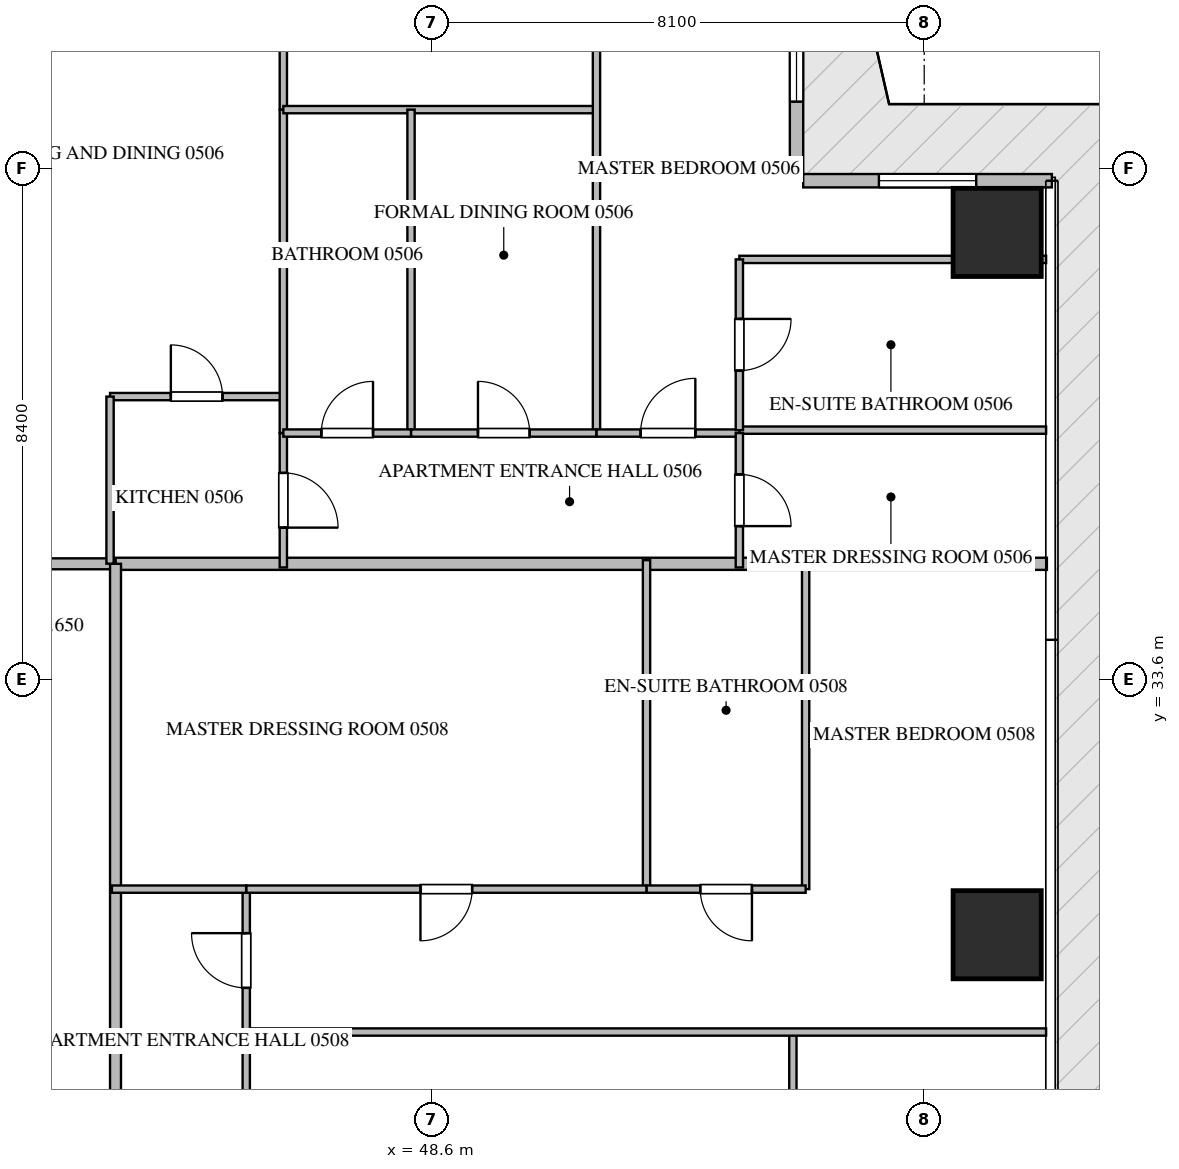
"""IFC4 building model, lengths in metres.
Left out: names, types, materials, properties, quantities, classifications, styles, units other than length and angle.
Written with IfcOpenShell. Run it as: python <this file> out.ifc"""

import sys

from ifc_helpers import new_model, si_unit, direction, frame, frame_2d, origin, origin_2d, place, context, subcontext, project, spatial, rectangle, extrude, source, transform, mapped, element, fill, save


model = new_model("IFC4")
c1 = context("Model", 3, precision=1e-05, world=origin(), true_north=direction((0.0, 1.0)))
c2 = subcontext(c1, "Body", "Model", "MODEL_VIEW")
j1 = project(units=[si_unit("LENGTHUNIT", "METRE"), si_unit("PLANEANGLEUNIT", "RADIAN")], contexts=[c1])
p1 = place(None, origin())
s1 = spatial("IfcSite", under=j1, at=p1, CompositionType="ELEMENT")
p2 = place(p1, origin())
s2 = spatial("IfcBuilding", under=s1, at=p2, CompositionType="ELEMENT")
p3 = place(p2, frame((0.0, 0.0, 26.7)))
s3 = spatial("IfcBuildingStorey", under=s2, at=p3, CompositionType="ELEMENT", Elevation=26.7)
m1 = source(origin(), c2, "Body", "SweptSolid", [
    extrude(rectangle(XDim=1.45, YDim=1.45, at=origin_2d()), origin(), (0.0, 0.0, 1.0), 3.93),
])
for number, where, z_axis, x_axis in (
    (1, (57.9, 29.4, -0.44), (0.0, 0.0, 1.0), (1.0, 0.0, 0.0)),
    (2, (57.9, 40.95, -0.44), (0.0, 0.0, 1.0), (1.0, 0.0, 0.0)),
):
    element("IfcColumn", number, at=place(p3, frame(where, z_axis=z_axis, x_axis=x_axis)), inside=s3, PredefinedType="COLUMN", context=c2, shape_type="MappedRepresentation", body=[
        mapped(m1, transform((0.0, 0.0, 0.0), scale=1.0)),
    ])
p4 = place(p3, frame((58.8, 41.8, 0.0), z_axis=(0.0, 0.0, 1.0), x_axis=(-1.0, 0.0, 0.0)))
e3 = element("IfcWall", 3, at=p4, inside=s3, PredefinedType="ELEMENTEDWALL", context=c2, shape_type="SweptSolid", body=[
    extrude(rectangle(XDim=4.09, YDim=0.22, at=frame_2d((2.045, 0.0))), origin(), (0.0, 0.0, 1.0), 3.475),
])
p5 = place(p4, frame((1.245, 0.0, 0.65)))
e4 = element("IfcOpeningElement", 4, at=p5, cuts=e3, PredefinedType="OPENING", context=c2, shape_type="SweptSolid", body=[
    extrude(rectangle(XDim=1.6, YDim=2.1, at=frame_2d((0.8, 1.05))), frame((0.0, 0.12, 0.0), z_axis=(0.0, -1.0, 0.0), x_axis=(1.0, 0.0, 0.0)), (0.0, 0.0, 1.0), 0.24),
])
p6 = place(p3, frame((54.6, 41.91, 0.0), z_axis=(0.0, 0.0, 1.0), x_axis=(0.0, 1.0, 0.0)))
e5 = element("IfcWall", 5, at=p6, inside=s3, PredefinedType="ELEMENTEDWALL", context=c2, shape_type="SweptSolid", body=[
    extrude(rectangle(XDim=3.98, YDim=0.22, at=frame_2d((1.99, 0.0))), origin(), (0.0, 0.0, 1.0), 3.475),
])
p7 = place(p6, frame((1.19, 0.0, 0.65)))
e6 = element("IfcOpeningElement", 6, at=p7, cuts=e5, PredefinedType="OPENING", context=c2, shape_type="SweptSolid", body=[
    extrude(rectangle(XDim=1.6, YDim=2.1, at=frame_2d((0.8, 1.05))), frame((0.0, 0.12, 0.0), z_axis=(0.0, -1.0, 0.0), x_axis=(1.0, 0.0, 0.0)), (0.0, 0.0, 1.0), 0.24),
])
p8 = place(p3, frame((43.4, 35.5, 0.0), z_axis=(0.0, 0.0, 1.0), x_axis=(1.0, 0.0, 0.0)))
e7 = element("IfcWall", 7, at=p8, inside=s3, PredefinedType="PARTITIONING", context=c2, shape_type="SweptSolid", body=[
    extrude(rectangle(XDim=15.318, YDim=0.2, at=frame_2d((7.659, 0.0))), origin(), (0.0, 0.0, 1.0), 3.49),
])
p9 = place(p3, frame((21.402, 35.5, 0.0), z_axis=(0.0, 0.0, 1.0), x_axis=(1.0, 0.0, 0.0)))
e8 = element("IfcWall", 8, at=p9, inside=s3, PredefinedType="PARTITIONING", context=c2, shape_type="SweptSolid", body=[
    extrude(rectangle(XDim=21.996, YDim=0.18, at=frame_2d((10.998, 0.0))), origin(), (0.0, 0.0, 1.0), 3.49),
])
p10 = place(p9, frame((2.1, 0.0, 0.0)))
e9 = element("IfcOpeningElement", 9, at=p10, cuts=e8, PredefinedType="OPENING", context=c2, shape_type="SweptSolid", body=[
    extrude(rectangle(XDim=1.0, YDim=2.15, at=frame_2d((0.5, 1.075))), frame((0.0, 0.1, 0.0), z_axis=(0.0, -1.0, 0.0), x_axis=(1.0, 0.0, 0.0)), (0.0, 0.0, 1.0), 0.2),
])
p11 = place(p9, frame((14.277, 0.0, 0.0)))
e10 = element("IfcOpeningElement", 10, at=p11, cuts=e8, PredefinedType="OPENING", context=c2, shape_type="SweptSolid", body=[
    extrude(rectangle(XDim=1.0, YDim=2.15, at=frame_2d((0.5, 1.075))), frame((0.0, 0.1, 0.0), z_axis=(0.0, -1.0, 0.0), x_axis=(1.0, 0.0, 0.0)), (0.0, 0.0, 1.0), 0.2),
])
p12 = place(p9, frame((18.896, 0.0, 0.0)))
e11 = element("IfcOpeningElement", 11, at=p12, cuts=e8, PredefinedType="OPENING", context=c2, shape_type="SweptSolid", body=[
    extrude(rectangle(XDim=1.0, YDim=2.15, at=frame_2d((0.5, 1.075))), frame((0.0, 0.1, 0.0), z_axis=(0.0, -1.0, 0.0), x_axis=(1.0, 0.0, 0.0)), (0.0, 0.0, 1.0), 0.2),
])
p13 = place(p3, frame((43.4, 14.9, 0.0), z_axis=(0.0, 0.0, 1.0), x_axis=(0.0, 1.0, 0.0)))
e12 = element("IfcWall", 12, at=p13, inside=s3, PredefinedType="PARTITIONING", context=c2, shape_type="SweptSolid", body=[
    extrude(rectangle(XDim=20.6, YDim=0.18, at=frame_2d((10.3, 0.0))), origin(), (0.0, 0.0, 1.0), 3.49),
])
p14 = place(p13, frame((1.96, 0.0, 0.0)))
e13 = element("IfcOpeningElement", 13, at=p14, cuts=e12, PredefinedType="OPENING", context=c2, shape_type="SweptSolid", body=[
    extrude(rectangle(XDim=1.0, YDim=2.15, at=frame_2d((0.5, 1.075))), frame((0.0, 0.1, 0.0), z_axis=(0.0, -1.0, 0.0), x_axis=(1.0, 0.0, 0.0)), (0.0, 0.0, 1.0), 0.2),
])
p15 = place(p3, frame((43.31, 38.25, 0.0), z_axis=(0.0, 0.0, 1.0), x_axis=(1.0, 0.0, 0.0)))
e14 = element("IfcWall", 14, at=p15, inside=s3, PredefinedType="PARTITIONING", context=c2, shape_type="SweptSolid", body=[
    extrude(rectangle(XDim=2.85, YDim=0.12, at=frame_2d((1.425, 0.0))), origin(), (0.0, 0.0, 1.0), 3.49),
])
p16 = place(p15, frame((1.0, 0.0, 0.0)))
e15 = element("IfcOpeningElement", 15, at=p16, cuts=e14, PredefinedType="OPENING", context=c2, shape_type="SweptSolid", body=[
    extrude(rectangle(XDim=0.85, YDim=2.1, at=frame_2d((0.425, 1.05))), frame((0.0, 0.07, 0.0), z_axis=(0.0, -1.0, 0.0), x_axis=(1.0, 0.0, 0.0)), (0.0, 0.0, 1.0), 0.14),
])
p17 = place(p3, frame((43.31, 38.25, 0.0), z_axis=(0.0, 0.0, 1.0), x_axis=(0.0, -1.0, 0.0)))
e16 = element("IfcWall", 16, at=p17, inside=s3, PredefinedType="PARTITIONING", context=c2, shape_type="SweptSolid", body=[
    extrude(rectangle(XDim=2.748, YDim=0.12, at=frame_2d((1.374, 0.0))), origin(), (0.0, 0.0, 1.0), 3.49),
])
p18 = place(p3, frame((46.16, 37.65, 0.0), z_axis=(0.0, 0.0, 1.0), x_axis=(0.0, -1.0, 0.0)))
e17 = element("IfcWall", 17, at=p18, inside=s3, PredefinedType="PARTITIONING", context=c2, shape_type="SweptSolid", body=[
    extrude(rectangle(XDim=2.21, YDim=0.12, at=frame_2d((1.105, 0.0))), origin(), (0.0, 0.0, 1.0), 3.49),
])
p19 = place(p18, frame((0.655, 0.0, 0.0)))
e18 = element("IfcOpeningElement", 18, at=p19, cuts=e17, PredefinedType="OPENING", context=c2, shape_type="SweptSolid", body=[
    extrude(rectangle(XDim=0.9, YDim=2.1, at=frame_2d((0.45, 1.05))), frame((0.0, 0.07, 0.0), z_axis=(0.0, -1.0, 0.0), x_axis=(1.0, 0.0, 0.0)), (0.0, 0.0, 1.0), 0.14),
])
p20 = place(p3, frame((46.16, 50.105, 0.0), z_axis=(0.0, 0.0, 1.0), x_axis=(0.0, -1.0, 0.0)))
e19 = element("IfcWall", 19, at=p20, inside=s3, PredefinedType="PARTITIONING", context=c2, shape_type="SweptSolid", body=[
    extrude(rectangle(XDim=7.136, YDim=0.12, at=frame_2d((3.568, 0.0))), origin(), (0.0, 0.0, 1.0), 3.49),
])
p21 = place(p20, frame((3.43, 0.0, 0.0)))
e20 = element("IfcOpeningElement", 20, at=p21, cuts=e19, PredefinedType="OPENING", context=c2, shape_type="SweptSolid", body=[
    extrude(rectangle(XDim=0.9, YDim=2.1, at=frame_2d((0.45, 1.05))), frame((0.0, 0.07, 0.0), z_axis=(0.0, -1.0, 0.0), x_axis=(1.0, 0.0, 0.0)), (0.0, 0.0, 1.0), 0.14),
])
p22 = place(p3, frame((46.16, 42.967, 0.0), z_axis=(0.0, 0.0, 1.0), x_axis=(0.0, -1.0, 0.0)))
e21 = element("IfcWall", 21, at=p22, inside=s3, PredefinedType="PARTITIONING", context=c2, shape_type="SweptSolid", body=[
    extrude(rectangle(XDim=5.315, YDim=0.12, at=frame_2d((2.657, 0.0))), origin(), (0.0, 0.0, 1.0), 3.49),
])
p23 = place(p3, frame((46.16, 42.969, 0.0), z_axis=(0.0, 0.0, 1.0), x_axis=(1.0, 0.0, 0.0)))
e22 = element("IfcWall", 22, at=p23, inside=s3, PredefinedType="PARTITIONING", context=c2, shape_type="SweptSolid", body=[
    extrude(rectangle(XDim=5.15, YDim=0.12, at=frame_2d((2.575, 0.0))), origin(), (0.0, 0.0, 1.0), 3.49),
])
p24 = place(p3, frame((51.31, 45.905, 0.0), z_axis=(0.0, 0.0, 1.0), x_axis=(0.0, -1.0, 0.0)))
e23 = element("IfcWall", 23, at=p24, inside=s3, PredefinedType="PARTITIONING", context=c2, shape_type="SweptSolid", body=[
    extrude(rectangle(XDim=8.255, YDim=0.12, at=frame_2d((4.127, 0.0))), origin(), (0.0, 0.0, 1.0), 3.49),
])
p25 = place(p3, frame((48.26, 42.969, 0.0), z_axis=(0.0, 0.0, 1.0), x_axis=(0.0, -1.0, 0.0)))
e24 = element("IfcWall", 24, at=p25, inside=s3, PredefinedType="PARTITIONING", context=c2, shape_type="SweptSolid", body=[
    extrude(rectangle(XDim=5.319, YDim=0.12, at=frame_2d((2.66, 0.0))), origin(), (0.0, 0.0, 1.0), 3.49),
])
p26 = place(p3, frame((46.16, 37.65, 0.0), z_axis=(0.0, 0.0, 1.0), x_axis=(1.0, 0.0, 0.0)))
e25 = element("IfcWall", 25, at=p26, inside=s3, PredefinedType="PARTITIONING", context=c2, shape_type="SweptSolid", body=[
    extrude(rectangle(XDim=2.1, YDim=0.12, at=frame_2d((1.05, 0.0))), origin(), (0.0, 0.0, 1.0), 3.49),
])
p27 = place(p26, frame((0.625, 0.0, 0.0)))
e26 = element("IfcOpeningElement", 26, at=p27, cuts=e25, PredefinedType="OPENING", context=c2, shape_type="SweptSolid", body=[
    extrude(rectangle(XDim=0.85, YDim=2.1, at=frame_2d((0.425, 1.05))), frame((0.0, 0.07, 0.0), z_axis=(0.0, -1.0, 0.0), x_axis=(1.0, 0.0, 0.0)), (0.0, 0.0, 1.0), 0.14),
])
p28 = place(p3, frame((48.262, 37.65, 0.0), z_axis=(0.0, 0.0, 1.0), x_axis=(1.0, 0.0, 0.0)))
e27 = element("IfcWall", 27, at=p28, inside=s3, PredefinedType="PARTITIONING", context=c2, shape_type="SweptSolid", body=[
    extrude(rectangle(XDim=3.048, YDim=0.12, at=frame_2d((1.524, 0.0))), origin(), (0.0, 0.0, 1.0), 3.49),
])
p29 = place(p28, frame((1.099, 0.0, 0.0)))
e28 = element("IfcOpeningElement", 28, at=p29, cuts=e27, PredefinedType="OPENING", context=c2, shape_type="SweptSolid", body=[
    extrude(rectangle(XDim=0.85, YDim=2.1, at=frame_2d((0.425, 1.05))), frame((0.0, 0.07, 0.0), z_axis=(0.0, -1.0, 0.0), x_axis=(1.0, 0.0, 0.0)), (0.0, 0.0, 1.0), 0.14),
])
p30 = place(p3, frame((51.312, 37.65, 0.0), z_axis=(0.0, 0.0, 1.0), x_axis=(1.0, 0.0, 0.0)))
e29 = element("IfcWall", 29, at=p30, inside=s3, PredefinedType="PARTITIONING", context=c2, shape_type="SweptSolid", body=[
    extrude(rectangle(XDim=2.348, YDim=0.12, at=frame_2d((1.174, 0.0))), origin(), (0.0, 0.0, 1.0), 3.49),
])
p31 = place(p30, frame((0.724, 0.0, 0.0)))
e30 = element("IfcOpeningElement", 30, at=p31, cuts=e29, PredefinedType="OPENING", context=c2, shape_type="SweptSolid", body=[
    extrude(rectangle(XDim=0.9, YDim=2.1, at=frame_2d((0.45, 1.05))), frame((0.0, 0.07, 0.0), z_axis=(0.0, -1.0, 0.0), x_axis=(1.0, 0.0, 0.0)), (0.0, 0.0, 1.0), 0.14),
])
p32 = place(p3, frame((53.66, 40.506, 0.0), z_axis=(0.0, 0.0, 1.0), x_axis=(1.0, 0.0, 0.0)))
e31 = element("IfcWall", 31, at=p32, inside=s3, PredefinedType="PARTITIONING", context=c2, shape_type="SweptSolid", body=[
    extrude(rectangle(XDim=5.045, YDim=0.12, at=frame_2d((2.522, 0.0))), origin(), (0.0, 0.0, 1.0), 3.49),
])
p33 = place(p3, frame((53.662, 37.698, 0.0), z_axis=(0.0, 0.0, 1.0), x_axis=(1.0, 0.0, 0.0)))
e32 = element("IfcWall", 32, at=p33, inside=s3, PredefinedType="PARTITIONING", context=c2, shape_type="SweptSolid", body=[
    extrude(rectangle(XDim=5.043, YDim=0.12, at=frame_2d((2.521, 0.0))), origin(), (0.0, 0.0, 1.0), 3.49),
])
p34 = place(p3, frame((53.66, 40.506, 0.0), z_axis=(0.0, 0.0, 1.0), x_axis=(0.0, -1.0, 0.0)))
e33 = element("IfcWall", 33, at=p34, inside=s3, PredefinedType="PARTITIONING", context=c2, shape_type="SweptSolid", body=[
    extrude(rectangle(XDim=2.808, YDim=0.12, at=frame_2d((1.404, 0.0))), origin(), (0.0, 0.0, 1.0), 3.49),
])
p35 = place(p34, frame((0.979, 0.0, 0.0)))
e34 = element("IfcOpeningElement", 34, at=p35, cuts=e33, PredefinedType="OPENING", context=c2, shape_type="SweptSolid", body=[
    extrude(rectangle(XDim=0.85, YDim=2.1, at=frame_2d((0.425, 1.05))), frame((0.0, 0.07, 0.0), z_axis=(0.0, -1.0, 0.0), x_axis=(1.0, 0.0, 0.0)), (0.0, 0.0, 1.0), 0.14),
])
p36 = place(p3, frame((53.66, 37.65, 0.0), z_axis=(0.0, 0.0, 1.0), x_axis=(0.0, -1.0, 0.0)))
e35 = element("IfcWall", 35, at=p36, inside=s3, PredefinedType="PARTITIONING", context=c2, shape_type="SweptSolid", body=[
    extrude(rectangle(XDim=2.21, YDim=0.12, at=frame_2d((1.105, 0.0))), origin(), (0.0, 0.0, 1.0), 3.49),
])
p37 = place(p36, frame((0.68, 0.0, 0.0)))
e36 = element("IfcOpeningElement", 36, at=p37, cuts=e35, PredefinedType="OPENING", context=c2, shape_type="SweptSolid", body=[
    extrude(rectangle(XDim=0.85, YDim=2.1, at=frame_2d((0.425, 1.05))), frame((0.0, 0.07, 0.0), z_axis=(0.0, -1.0, 0.0), x_axis=(1.0, 0.0, 0.0)), (0.0, 0.0, 1.0), 0.14),
])
p38 = place(p3, frame((54.54, 22.73, 0.0), z_axis=(0.0, 0.0, 1.0), x_axis=(0.0, 1.0, 0.0)))
e37 = element("IfcWall", 37, at=p38, inside=s3, PredefinedType="PARTITIONING", context=c2, shape_type="SweptSolid", body=[
    extrude(rectangle(XDim=5.07, YDim=0.12, at=frame_2d((2.535, 0.0))), origin(), (0.0, 0.0, 1.0), 3.49),
])
p39 = place(p3, frame((58.705, 27.8, 0.0), z_axis=(0.0, 0.0, 1.0), x_axis=(-1.0, 0.0, 0.0)))
e38 = element("IfcWall", 38, at=p39, inside=s3, PredefinedType="PARTITIONING", context=c2, shape_type="SweptSolid", body=[
    extrude(rectangle(XDim=13.155, YDim=0.12, at=frame_2d((6.578, 0.0))), origin(), (0.0, 0.0, 1.0), 3.49),
])
p40 = place(p3, frame((45.55, 24.832, 0.0), z_axis=(0.0, 0.0, 1.0), x_axis=(0.0, 1.0, 0.0)))
e39 = element("IfcWall", 39, at=p40, inside=s3, PredefinedType="PARTITIONING", context=c2, shape_type="SweptSolid", body=[
    extrude(rectangle(XDim=2.968, YDim=0.12, at=frame_2d((1.484, 0.0))), origin(), (0.0, 0.0, 1.0), 3.49),
])
p41 = place(p40, frame((1.059, 0.0, 0.0)))
e40 = element("IfcOpeningElement", 40, at=p41, cuts=e39, PredefinedType="OPENING", context=c2, shape_type="SweptSolid", body=[
    extrude(rectangle(XDim=0.85, YDim=2.1, at=frame_2d((0.425, 1.05))), frame((0.0, 0.07, 0.0), z_axis=(0.0, -1.0, 0.0), x_axis=(1.0, 0.0, 0.0)), (0.0, 0.0, 1.0), 0.14),
])
p42 = place(p3, frame((45.55, 27.802, 0.0), z_axis=(0.0, 0.0, 1.0), x_axis=(0.0, 1.0, 0.0)))
e41 = element("IfcWall", 41, at=p42, inside=s3, PredefinedType="PARTITIONING", context=c2, shape_type="SweptSolid", body=[
    extrude(rectangle(XDim=2.348, YDim=0.12, at=frame_2d((1.174, 0.0))), origin(), (0.0, 0.0, 1.0), 3.49),
])
p43 = place(p42, frame((0.724, 0.0, 0.0)))
e42 = element("IfcOpeningElement", 42, at=p43, cuts=e41, PredefinedType="OPENING", context=c2, shape_type="SweptSolid", body=[
    extrude(rectangle(XDim=0.9, YDim=2.1, at=frame_2d((0.45, 1.05))), frame((0.0, 0.07, 0.0), z_axis=(0.0, -1.0, 0.0), x_axis=(1.0, 0.0, 0.0)), (0.0, 0.0, 1.0), 0.14),
])
for number, where, z_axis, x_axis in (
    (43, (54.75, 30.15, 0.0), (0.0, 0.0, 1.0), (0.0, 1.0, 0.0)),
    (44, (52.133, 30.15, 0.0), (0.0, 0.0, 1.0), (0.0, 1.0, 0.0)),
):
    element("IfcWall", number, at=place(p3, frame(where, z_axis=z_axis, x_axis=x_axis)), inside=s3, PredefinedType="PARTITIONING", context=c2, shape_type="SweptSolid", body=[
        extrude(rectangle(XDim=5.41, YDim=0.12, at=frame_2d((2.705, 0.0))), origin(), (0.0, 0.0, 1.0), 3.49),
    ])
p44 = place(p3, frame((54.75, 30.15, 0.0), z_axis=(0.0, 0.0, 1.0), x_axis=(-1.0, 0.0, 0.0)))
e45 = element("IfcWall", 45, at=p44, inside=s3, PredefinedType="PARTITIONING", context=c2, shape_type="SweptSolid", body=[
    extrude(rectangle(XDim=2.617, YDim=0.12, at=frame_2d((1.309, 0.0))), origin(), (0.0, 0.0, 1.0), 3.49),
])
p45 = place(p44, frame((0.883, 0.0, 0.0)))
e46 = element("IfcOpeningElement", 46, at=p45, cuts=e45, PredefinedType="OPENING", context=c2, shape_type="SweptSolid", body=[
    extrude(rectangle(XDim=0.85, YDim=2.1, at=frame_2d((0.425, 1.05))), frame((0.0, 0.07, 0.0), z_axis=(0.0, -1.0, 0.0), x_axis=(1.0, 0.0, 0.0)), (0.0, 0.0, 1.0), 0.14),
])
p46 = place(p3, frame((52.131, 30.15, 0.0), z_axis=(0.0, 0.0, 1.0), x_axis=(-1.0, 0.0, 0.0)))
e47 = element("IfcWall", 47, at=p46, inside=s3, PredefinedType="PARTITIONING", context=c2, shape_type="SweptSolid", body=[
    extrude(rectangle(XDim=6.581, YDim=0.12, at=frame_2d((3.291, 0.0))), origin(), (0.0, 0.0, 1.0), 3.49),
])
p47 = place(p46, frame((2.866, 0.0, 0.0)))
e48 = element("IfcOpeningElement", 48, at=p47, cuts=e47, PredefinedType="OPENING", context=c2, shape_type="SweptSolid", body=[
    extrude(rectangle(XDim=0.85, YDim=2.1, at=frame_2d((0.425, 1.05))), frame((0.0, 0.07, 0.0), z_axis=(0.0, -1.0, 0.0), x_axis=(1.0, 0.0, 0.0)), (0.0, 0.0, 1.0), 0.14),
])
p48 = place(p3, frame((45.548, 30.15, 0.0), z_axis=(0.0, 0.0, 1.0), x_axis=(-1.0, 0.0, 0.0)))
e49 = element("IfcWall", 49, at=p48, inside=s3, PredefinedType="PARTITIONING", context=c2, shape_type="SweptSolid", body=[
    extrude(rectangle(XDim=2.208, YDim=0.12, at=frame_2d((1.104, 0.0))), origin(), (0.0, 0.0, 1.0), 3.49),
])
m2 = source(origin(), c2, "Body", "SweptSolid", [
    extrude(rectangle(XDim=1.6, YDim=2.1, at=frame_2d((0.8, 1.05))), frame((0.0, 0.03, 0.0), z_axis=(0.0, -1.0, 0.0), x_axis=(1.0, 0.0, 0.0)), (0.0, 0.0, 1.0), 0.06),
])
p49 = place(p5, origin())
e50 = element("IfcWindow", 50, at=p49, inside=s3, PartitioningType="SINGLE_PANEL", PredefinedType="WINDOW", context=c2, shape_type="MappedRepresentation", body=[
    mapped(m2, transform((0.0, 0.0, 0.0), scale=1.0)),
])
fill(e4, e50)
p50 = place(p7, origin())
e51 = element("IfcWindow", 51, at=p50, inside=s3, PartitioningType="SINGLE_PANEL", PredefinedType="WINDOW", context=c2, shape_type="MappedRepresentation", body=[
    mapped(m2, transform((0.0, 0.0, 0.0), scale=1.0)),
])
fill(e6, e51)
m3 = source(origin(), c2, "Body", "SweptSolid", [
    extrude(rectangle(XDim=0.85, YDim=2.1, at=frame_2d((0.425, 1.05))), frame((0.0, 0.025, 0.0), z_axis=(0.0, -1.0, 0.0), x_axis=(1.0, 0.0, 0.0)), (0.0, 0.0, 1.0), 0.05),
])
p51 = place(p16, origin())
e52 = element("IfcDoor", 52, at=p51, inside=s3, OperationType="SINGLE_SWING_LEFT", PredefinedType="DOOR", context=c2, shape_type="MappedRepresentation", body=[
    mapped(m3, transform((0.0, 0.0, 0.0), scale=1.0)),
])
fill(e15, e52)
m4 = source(origin(), c2, "Body", "SweptSolid", [
    extrude(rectangle(XDim=0.9, YDim=2.1, at=frame_2d((0.45, 1.05))), frame((0.0, 0.025, 0.0), z_axis=(0.0, -1.0, 0.0), x_axis=(1.0, 0.0, 0.0)), (0.0, 0.0, 1.0), 0.05),
])
p52 = place(p19, origin())
e53 = element("IfcDoor", 53, at=p52, inside=s3, OperationType="SINGLE_SWING_RIGHT", PredefinedType="DOOR", context=c2, shape_type="MappedRepresentation", body=[
    mapped(m4, transform((0.0, 0.0, 0.0), scale=1.0)),
])
fill(e18, e53)
p53 = place(p27, origin())
e54 = element("IfcDoor", 54, at=p53, inside=s3, OperationType="SINGLE_SWING_RIGHT", PredefinedType="DOOR", context=c2, shape_type="MappedRepresentation", body=[
    mapped(m3, transform((0.0, 0.0, 0.0), scale=1.0)),
])
fill(e26, e54)
p54 = place(p29, origin())
e55 = element("IfcDoor", 55, at=p54, inside=s3, OperationType="SINGLE_SWING_LEFT", PredefinedType="DOOR", context=c2, shape_type="MappedRepresentation", body=[
    mapped(m3, transform((0.0, 0.0, 0.0), scale=1.0)),
])
fill(e28, e55)
p55 = place(p31, origin())
e56 = element("IfcDoor", 56, at=p55, inside=s3, OperationType="SINGLE_SWING_RIGHT", PredefinedType="DOOR", context=c2, shape_type="MappedRepresentation", body=[
    mapped(m4, transform((0.0, 0.0, 0.0), scale=1.0)),
])
fill(e30, e56)
p56 = place(p35, origin())
e57 = element("IfcDoor", 57, at=p56, inside=s3, OperationType="SINGLE_SWING_LEFT", PredefinedType="DOOR", context=c2, shape_type="MappedRepresentation", body=[
    mapped(m3, transform((0.0, 0.0, 0.0), scale=1.0)),
])
fill(e34, e57)
p57 = place(p37, origin())
e58 = element("IfcDoor", 58, at=p57, inside=s3, OperationType="SINGLE_SWING_RIGHT", PredefinedType="DOOR", context=c2, shape_type="MappedRepresentation", body=[
    mapped(m3, transform((0.0, 0.0, 0.0), scale=1.0)),
])
fill(e36, e58)
p58 = place(p43, origin())
e59 = element("IfcDoor", 59, at=p58, inside=s3, OperationType="SINGLE_SWING_RIGHT", PredefinedType="DOOR", context=c2, shape_type="MappedRepresentation", body=[
    mapped(m4, transform((0.0, 0.0, 0.0), scale=1.0)),
])
fill(e42, e59)
p59 = place(p45, origin())
e60 = element("IfcDoor", 60, at=p59, inside=s3, OperationType="SINGLE_SWING_LEFT", PredefinedType="DOOR", context=c2, shape_type="MappedRepresentation", body=[
    mapped(m3, transform((0.0, 0.0, 0.0), scale=1.0)),
])
fill(e46, e60)
p60 = place(p47, origin())
e61 = element("IfcDoor", 61, at=p60, inside=s3, OperationType="SINGLE_SWING_RIGHT", PredefinedType="DOOR", context=c2, shape_type="MappedRepresentation", body=[
    mapped(m3, transform((0.0, 0.0, 0.0), scale=1.0)),
])
fill(e48, e61)
save(model, sys.argv[1])
